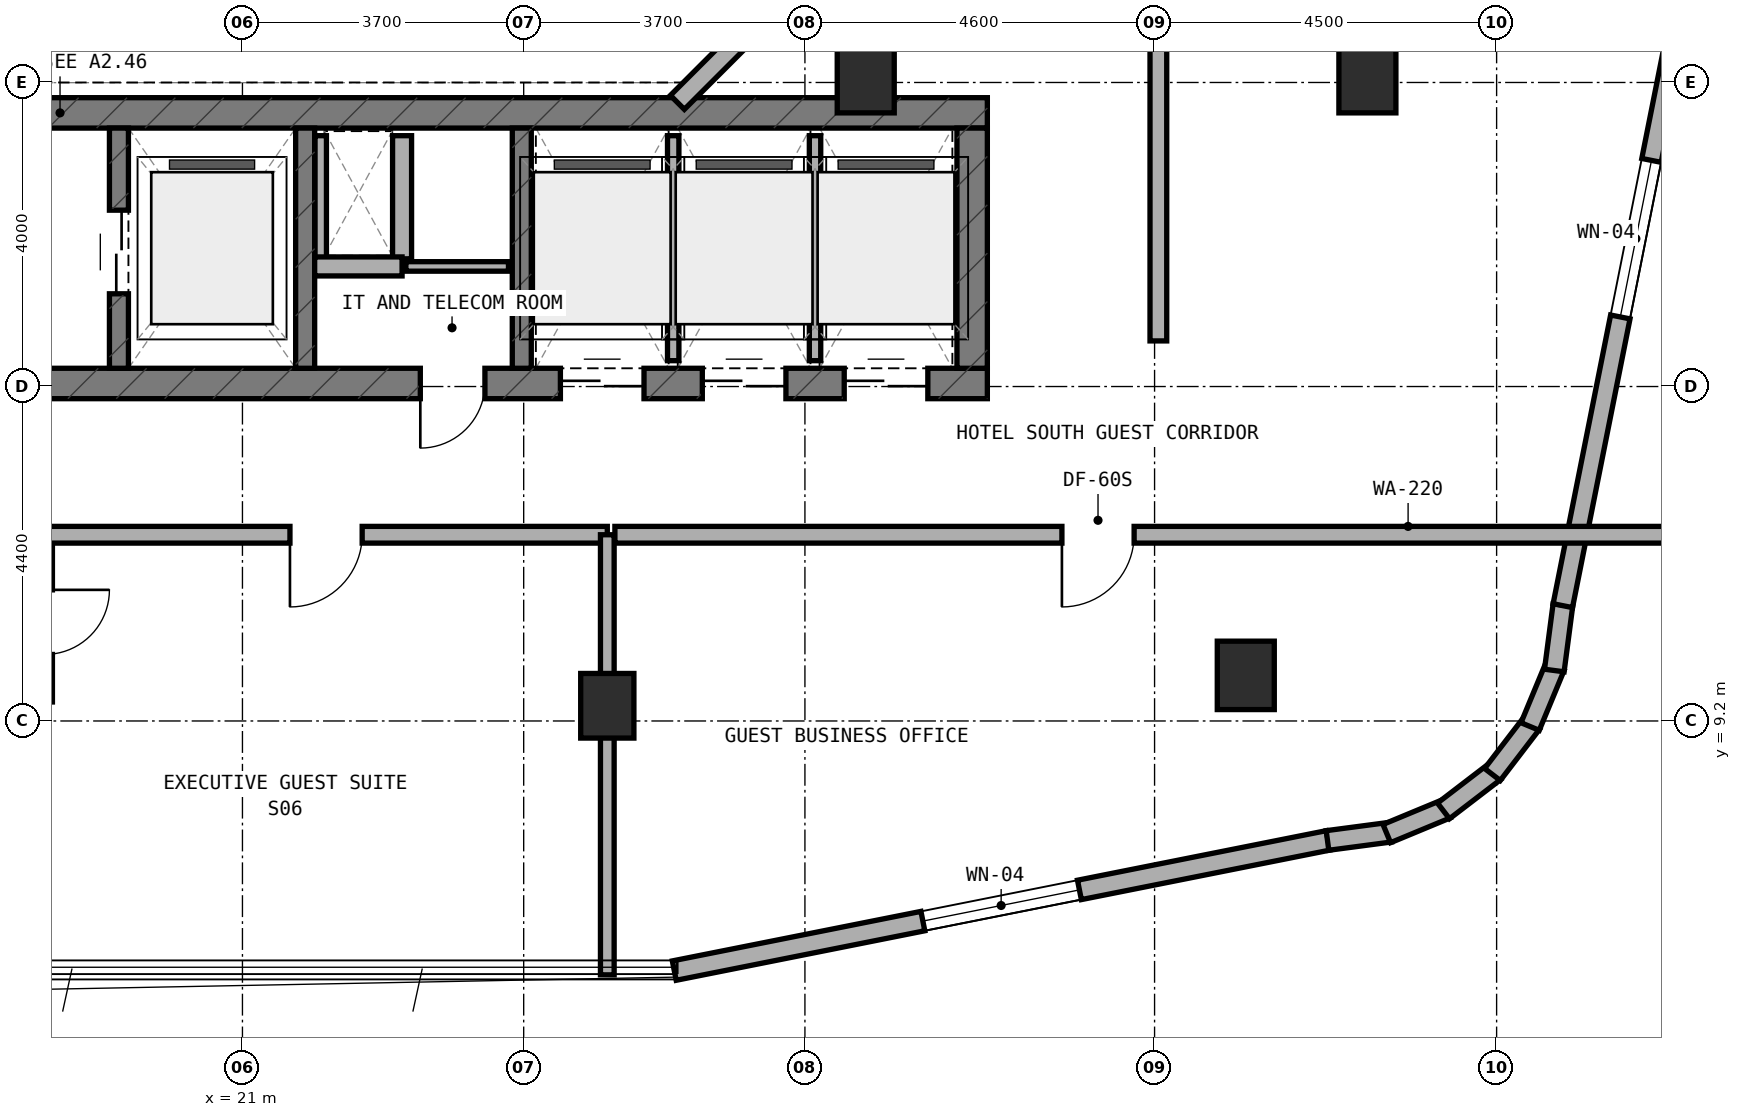
"""IFC4 building model, lengths in metres.
Left out: names, types, materials, properties, quantities, classifications, styles, units other than length and angle.
Written with IfcOpenShell. Run it as: python <this file> out.ifc"""

import sys

from ifc_helpers import new_model, si_unit, direction, frame, frame_2d, origin, origin_2d, place, context, subcontext, project, spatial, rectangle, extrude, element, fill, save


model = new_model("IFC4")
c1 = context("Model", 3, precision=1e-05, world=origin(), true_north=direction((0.0, 1.0)))
c2 = subcontext(c1, "Body", "Model", "MODEL_VIEW")
j1 = project(units=[si_unit("LENGTHUNIT", "METRE"), si_unit("PLANEANGLEUNIT", "RADIAN")], contexts=[c1])
p1 = place(None, origin())
s1 = spatial("IfcSite", under=j1, at=p1, CompositionType="ELEMENT")
p2 = place(p1, origin())
s2 = spatial("IfcBuilding", under=s1, at=p2, CompositionType="ELEMENT")
p3 = place(p2, frame((0.0, 0.0, 217.1)))
s3 = spatial("IfcBuildingStorey", under=s2, at=p3, CompositionType="ELEMENT", Elevation=217.1)
p4 = place(p3, frame((6.4, 13.64, 0.0), z_axis=(0.0, 0.0, 1.0), x_axis=(1.0, 0.0, 0.0)))
e1 = element("IfcWall", 1, at=p4, inside=s3, PredefinedType="SHEAR", context=c2, shape_type="SweptSolid", body=[
    extrude(rectangle(XDim=24.4, YDim=0.4, at=frame_2d((12.2, 0.0))), origin(), (0.0, 0.0, 1.0), 3.6),
])
p5 = place(p4, frame((9.15, 0.0, 0.0)))
e2 = element("IfcOpeningElement", 2, at=p5, cuts=e1, PredefinedType="OPENING", context=c2, shape_type="SweptSolid", body=[
    extrude(rectangle(XDim=1.2, YDim=2.15, at=frame_2d((0.6, 1.075))), frame((0.0, 0.21, 0.0), z_axis=(0.0, -1.0, 0.0), x_axis=(1.0, 0.0, 0.0)), (0.0, 0.0, 1.0), 0.42),
])
p6 = place(p4, frame((16.94, 0.0, 0.0)))
e3 = element("IfcOpeningElement", 3, at=p6, cuts=e1, PredefinedType="OPENING", context=c2, shape_type="SweptSolid", body=[
    extrude(rectangle(XDim=0.85, YDim=2.1, at=frame_2d((0.425, 1.05))), frame((0.0, 0.21, 0.0), z_axis=(0.0, -1.0, 0.0), x_axis=(1.0, 0.0, 0.0)), (0.0, 0.0, 1.0), 0.42),
])
p7 = place(p4, frame((18.783, 0.0, 0.0)))
e4 = element("IfcOpeningElement", 4, at=p7, cuts=e1, PredefinedType="OPENING", context=c2, shape_type="SweptSolid", body=[
    extrude(rectangle(XDim=1.1, YDim=2.15, at=frame_2d((0.55, 1.075))), frame((0.0, 0.21, 0.0), z_axis=(0.0, -1.0, 0.0), x_axis=(1.0, 0.0, 0.0)), (0.0, 0.0, 1.0), 0.42),
])
p8 = place(p4, frame((20.65, 0.0, 0.0)))
e5 = element("IfcOpeningElement", 5, at=p8, cuts=e1, PredefinedType="OPENING", context=c2, shape_type="SweptSolid", body=[
    extrude(rectangle(XDim=1.1, YDim=2.15, at=frame_2d((0.55, 1.075))), frame((0.0, 0.21, 0.0), z_axis=(0.0, -1.0, 0.0), x_axis=(1.0, 0.0, 0.0)), (0.0, 0.0, 1.0), 0.42),
])
p9 = place(p4, frame((22.517, 0.0, 0.0)))
e6 = element("IfcOpeningElement", 6, at=p9, cuts=e1, PredefinedType="OPENING", context=c2, shape_type="SweptSolid", body=[
    extrude(rectangle(XDim=1.1, YDim=2.15, at=frame_2d((0.55, 1.075))), frame((0.0, 0.21, 0.0), z_axis=(0.0, -1.0, 0.0), x_axis=(1.0, 0.0, 0.0)), (0.0, 0.0, 1.0), 0.42),
])
p10 = place(p3, frame((6.4, 17.2, 0.0), z_axis=(0.0, 0.0, 1.0), x_axis=(1.0, 0.0, 0.0)))
e7 = element("IfcWall", 7, at=p10, inside=s3, PredefinedType="SHEAR", context=c2, shape_type="SweptSolid", body=[
    extrude(rectangle(XDim=24.4, YDim=0.4, at=frame_2d((12.2, 0.0))), origin(), (0.0, 0.0, 1.0), 3.6),
])
p11 = place(p3, frame((30.6, 13.84, 0.0), z_axis=(0.0, 0.0, 1.0), x_axis=(0.0, 1.0, 0.0)))
e8 = element("IfcWall", 8, at=p11, inside=s3, PredefinedType="SHEAR", context=c2, shape_type="SweptSolid", body=[
    extrude(rectangle(XDim=3.16, YDim=0.4, at=frame_2d((1.58, 0.0))), origin(), (0.0, 0.0, 1.0), 3.6),
])
p12 = place(p3, frame((19.375, 13.84, 0.0), z_axis=(0.0, 0.0, 1.0), x_axis=(0.0, 1.0, 0.0)))
e9 = element("IfcWall", 9, at=p12, inside=s3, PredefinedType="STANDARD", context=c2, shape_type="SweptSolid", body=[
    extrude(rectangle(XDim=3.16, YDim=0.25, at=frame_2d((1.58, 0.0))), origin(), (0.0, 0.0, 1.0), 3.32),
])
p13 = place(p12, frame((0.98, 0.0, 0.0)))
e10 = element("IfcOpeningElement", 10, at=p13, cuts=e9, PredefinedType="OPENING", context=c2, shape_type="SweptSolid", body=[
    extrude(rectangle(XDim=1.1, YDim=2.15, at=frame_2d((0.55, 1.075))), frame((0.0, 0.135, 0.0), z_axis=(0.0, -1.0, 0.0), x_axis=(1.0, 0.0, 0.0)), (0.0, 0.0, 1.0), 0.27),
])
for number, where, z_axis, x_axis in (
    (11, (21.825, 13.84, 0.0), (0.0, 0.0, 1.0), (0.0, 1.0, 0.0)),
    (12, (24.675, 13.84, 0.0), (0.0, 0.0, 1.0), (0.0, 1.0, 0.0)),
):
    element("IfcWall", number, at=place(p3, frame(where, z_axis=z_axis, x_axis=x_axis)), inside=s3, PredefinedType="STANDARD", context=c2, shape_type="SweptSolid", body=[
        extrude(rectangle(XDim=3.16, YDim=0.25, at=frame_2d((1.58, 0.0))), origin(), (0.0, 0.0, 1.0), 3.32),
    ])
p14 = place(p3, frame((25.8, 9.4, 0.0), z_axis=(0.0, 0.0, 1.0), x_axis=(1.0, 0.0, 0.0)))
e13 = element("IfcColumn", 13, at=p14, inside=s3, PredefinedType="COLUMN", context=c2, shape_type="SweptSolid", body=[
    extrude(rectangle(XDim=0.7, YDim=0.85, at=origin_2d()), origin(), (0.0, 0.0, 1.0), 3.6),
])
for number, where, z_axis, x_axis in (
    (14, (34.2, 9.8, 0.0), (0.0, 0.0, 1.0), (1.0, 0.0, 0.0)),
    (15, (35.8, 17.65, 0.0), (0.0, 0.0, 1.0), (1.0, 0.0, 0.0)),
    (16, (29.2, 17.65, 0.0), (0.0, 0.0, 1.0), (1.0, 0.0, 0.0)),
):
    element("IfcColumn", number, at=place(p3, frame(where, z_axis=z_axis, x_axis=x_axis)), inside=s3, PredefinedType="COLUMN", context=c2, shape_type="SweptSolid", body=[
        extrude(rectangle(XDim=0.75, YDim=0.9, at=origin_2d()), origin(), (0.0, 0.0, 1.0), 3.6),
    ])
p15 = place(p3, frame((26.681, 5.916, 0.0), z_axis=(0.0, 0.0, 1.0), x_axis=(0.980745199176, 0.195291715883, 0.0)))
e17 = element("IfcWall", 17, at=p15, inside=s3, PredefinedType="STANDARD", context=c2, shape_type="SweptSolid", body=[
    extrude(rectangle(XDim=8.771, YDim=0.26, at=frame_2d((4.385, 0.0))), origin(), (0.0, 0.0, 1.0), 3.32),
])
p16 = place(p15, frame((3.335, 0.0, 0.85)))
e18 = element("IfcOpeningElement", 18, at=p16, cuts=e17, PredefinedType="OPENING", context=c2, shape_type="SweptSolid", body=[
    extrude(rectangle(XDim=2.1, YDim=1.5, at=frame_2d((1.05, 0.75))), frame((0.0, 0.14, 0.0), z_axis=(0.0, -1.0, 0.0), x_axis=(1.0, 0.0, 0.0)), (0.0, 0.0, 1.0), 0.28),
])
p17 = place(p3, frame((35.275, 7.628, 0.0), z_axis=(0.0, 0.0, 1.0), x_axis=(0.9913883573, 0.130954667764, 0.0)))
e19 = element("IfcWall", 19, at=p17, inside=s3, PredefinedType="STANDARD", context=c2, shape_type="SweptSolid", body=[
    extrude(rectangle(XDim=0.833, YDim=0.26, at=frame_2d((0.417, 0.0))), origin(), (0.0, 0.0, 1.0), 3.32),
])
p18 = place(p3, frame((36.055, 7.719, 0.0), z_axis=(0.0, 0.0, 1.0), x_axis=(0.923754491172, 0.382985169477, 0.0)))
e20 = element("IfcWall", 20, at=p18, inside=s3, PredefinedType="STANDARD", context=c2, shape_type="SweptSolid", body=[
    extrude(rectangle(XDim=0.851, YDim=0.26, at=frame_2d((0.426, 0.0))), origin(), (0.0, 0.0, 1.0), 3.32),
])
for number, where, z_axis, x_axis in (
    (21, (36.801, 8.017, 0.0), (0.0, 0.0, 1.0), (0.794, 0.608, 0.0)),
    (22, (37.445, 8.496, 0.0), (0.0, 0.0, 1.0), (0.608, 0.794, 0.0)),
):
    element("IfcWall", number, at=place(p3, frame(where, z_axis=z_axis, x_axis=x_axis)), inside=s3, PredefinedType="STANDARD", context=c2, shape_type="SweptSolid", body=[
        extrude(rectangle(XDim=0.85, YDim=0.26, at=frame_2d((0.425, 0.0))), origin(), (0.0, 0.0, 1.0), 3.32),
    ])
p19 = place(p3, frame((37.941, 9.127, 0.0), z_axis=(0.0, 0.0, 1.0), x_axis=(0.383229930484, 0.923652976167, 0.0)))
e23 = element("IfcWall", 23, at=p19, inside=s3, PredefinedType="STANDARD", context=c2, shape_type="SweptSolid", body=[
    extrude(rectangle(XDim=0.851, YDim=0.26, at=frame_2d((0.426, 0.0))), origin(), (0.0, 0.0, 1.0), 3.32),
])
p20 = place(p3, frame((38.259, 9.864, 0.0), z_axis=(0.0, 0.0, 1.0), x_axis=(0.130156359936, 0.991493480548, 0.0)))
e24 = element("IfcWall", 24, at=p20, inside=s3, PredefinedType="STANDARD", context=c2, shape_type="SweptSolid", body=[
    extrude(rectangle(XDim=0.868, YDim=0.26, at=frame_2d((0.434, 0.0))), origin(), (0.0, 0.0, 1.0), 3.32),
])
p21 = place(p3, frame((38.371, 10.717, 0.0), z_axis=(0.0, 0.0, 1.0), x_axis=(0.195291715883, 0.980745199176, 0.0)))
e25 = element("IfcWall", 25, at=p21, inside=s3, PredefinedType="STANDARD", context=c2, shape_type="SweptSolid", body=[
    extrude(rectangle(XDim=8.771, YDim=0.26, at=frame_2d((4.385, 0.0))), origin(), (0.0, 0.0, 1.0), 3.32),
])
p22 = place(p21, frame((3.873, 0.0, 0.85)))
e26 = element("IfcOpeningElement", 26, at=p22, cuts=e25, PredefinedType="OPENING", context=c2, shape_type="SweptSolid", body=[
    extrude(rectangle(XDim=2.1, YDim=1.5, at=frame_2d((1.05, 0.75))), frame((0.0, 0.14, 0.0), z_axis=(0.0, -1.0, 0.0), x_axis=(1.0, 0.0, 0.0)), (0.0, 0.0, 1.0), 0.28),
])
p23 = place(p3, frame((26.722, 17.338, 0.0), z_axis=(0.0, 0.0, 1.0), x_axis=(0.707059717605, 0.707153841636, 0.0)))
e27 = element("IfcWall", 27, at=p23, inside=s3, PredefinedType="STANDARD", context=c2, shape_type="SweptSolid", body=[
    extrude(rectangle(XDim=2.594, YDim=0.26, at=frame_2d((1.297, 0.0))), origin(), (0.0, 0.0, 1.0), 3.32),
])
p24 = place(p3, frame((22.03, 15.28, 0.0), z_axis=(0.0, 0.0, 1.0), x_axis=(0.0, 1.0, 0.0)))
e28 = element("IfcWall", 28, at=p24, inside=s3, PredefinedType="PARTITIONING", context=c2, shape_type="SweptSolid", body=[
    extrude(rectangle(XDim=1.62, YDim=0.15, at=frame_2d((0.81, 0.0))), origin(), (0.0, 0.0, 1.0), 3.32),
])
p25 = place(p3, frame((23.1, 15.28, 0.0), z_axis=(0.0, 0.0, 1.0), x_axis=(0.0, 1.0, 0.0)))
e29 = element("IfcWall", 29, at=p25, inside=s3, PredefinedType="SOLIDWALL", context=c2, shape_type="SweptSolid", body=[
    extrude(rectangle(XDim=1.62, YDim=0.25, at=frame_2d((0.81, 0.0))), origin(), (0.0, 0.0, 1.0), 3.32),
])
p26 = place(p3, frame((21.95, 15.18, 0.0), z_axis=(0.0, 0.0, 1.0), x_axis=(1.0, 0.0, 0.0)))
e30 = element("IfcWall", 30, at=p26, inside=s3, PredefinedType="SOLIDWALL", context=c2, shape_type="SweptSolid", body=[
    extrude(rectangle(XDim=1.15, YDim=0.25, at=frame_2d((0.575, 0.0))), origin(), (0.0, 0.0, 1.0), 3.32),
])
p27 = place(p3, frame((23.15, 15.18, 0.0), z_axis=(0.0, 0.0, 1.0), x_axis=(1.0, 0.0, 0.0)))
e31 = element("IfcWall", 31, at=p27, inside=s3, PredefinedType="PARTITIONING", context=c2, shape_type="SweptSolid", body=[
    extrude(rectangle(XDim=1.35, YDim=0.125, at=frame_2d((0.675, 0.0))), origin(), (0.0, 0.0, 1.0), 3.32),
])
p28 = place(p3, frame((26.667, 13.94, 0.0), z_axis=(0.0, 0.0, 1.0), x_axis=(0.0, 1.0, 0.0)))
e32 = element("IfcWall", 32, at=p28, inside=s3, PredefinedType="PARTITIONING", context=c2, shape_type="SweptSolid", body=[
    extrude(rectangle(XDim=2.96, YDim=0.15, at=frame_2d((1.48, 0.0))), origin(), (0.0, 0.0, 1.0), 3.32),
])
p29 = place(p3, frame((28.533, 13.94, 0.0), z_axis=(0.0, 0.0, 1.0), x_axis=(0.0, 1.0, 0.0)))
e33 = element("IfcWall", 33, at=p29, inside=s3, PredefinedType="PARTITIONING", context=c2, shape_type="SweptSolid", body=[
    extrude(rectangle(XDim=2.96, YDim=0.15, at=frame_2d((1.48, 0.0))), origin(), (0.0, 0.0, 1.0), 2.695),
])
p30 = place(p3, frame((18.4, 11.65, 0.0), z_axis=(0.0, 0.0, 1.0), x_axis=(1.0, 0.0, 0.0)))
e34 = element("IfcWall", 34, at=p30, inside=s3, PredefinedType="SOLIDWALL", context=c2, shape_type="SweptSolid", body=[
    extrude(rectangle(XDim=7.4, YDim=0.22, at=frame_2d((3.7, 0.0))), origin(), (0.0, 0.0, 1.0), 2.695),
])
p31 = place(p30, frame((3.225, 0.0, 0.0)))
e35 = element("IfcOpeningElement", 35, at=p31, cuts=e34, PredefinedType="OPENING", context=c2, shape_type="SweptSolid", body=[
    extrude(rectangle(XDim=0.95, YDim=2.1, at=frame_2d((0.475, 1.05))), frame((0.0, 0.12, 0.0), z_axis=(0.0, -1.0, 0.0), x_axis=(1.0, 0.0, 0.0)), (0.0, 0.0, 1.0), 0.24),
])
p32 = place(p3, frame((25.8, 5.86, 0.0), z_axis=(0.0, 0.0, 1.0), x_axis=(0.0, 1.0, 0.0)))
e36 = element("IfcWall", 36, at=p32, inside=s3, PredefinedType="SOLIDWALL", context=c2, shape_type="SweptSolid", body=[
    extrude(rectangle(XDim=5.79, YDim=0.18, at=frame_2d((2.895, 0.0))), origin(), (0.0, 0.0, 1.0), 2.695),
])
p33 = place(p3, frame((25.9, 11.65, 0.0), z_axis=(0.0, 0.0, 1.0), x_axis=(1.0, 0.0, 0.0)))
e37 = element("IfcWall", 37, at=p33, inside=s3, PredefinedType="SOLIDWALL", context=c2, shape_type="SweptSolid", body=[
    extrude(rectangle(XDim=14.04, YDim=0.22, at=frame_2d((7.02, 0.0))), origin(), (0.0, 0.0, 1.0), 2.695),
])
p34 = place(p33, frame((5.881, 0.0, 0.0)))
e38 = element("IfcOpeningElement", 38, at=p34, cuts=e37, PredefinedType="OPENING", context=c2, shape_type="SweptSolid", body=[
    extrude(rectangle(XDim=0.95, YDim=2.1, at=frame_2d((0.475, 1.05))), frame((0.0, 0.12, 0.0), z_axis=(0.0, -1.0, 0.0), x_axis=(1.0, 0.0, 0.0)), (0.0, 0.0, 1.0), 0.24),
])
p35 = place(p3, frame((33.05, 14.2, 0.0), z_axis=(0.0, 0.0, 1.0), x_axis=(0.0, 1.0, 0.0)))
e39 = element("IfcWall", 39, at=p35, inside=s3, PredefinedType="SOLIDWALL", context=c2, shape_type="SweptSolid", body=[
    extrude(rectangle(XDim=9.37, YDim=0.22, at=frame_2d((4.685, 0.0))), origin(), (0.0, 0.0, 1.0), 2.695),
])
p36 = place(p35, frame((4.21, 0.0, 0.0)))
e40 = element("IfcOpeningElement", 40, at=p36, cuts=e39, PredefinedType="OPENING", context=c2, shape_type="SweptSolid", body=[
    extrude(rectangle(XDim=0.95, YDim=2.1, at=frame_2d((0.475, 1.05))), frame((0.0, 0.12, 0.0), z_axis=(0.0, -1.0, 0.0), x_axis=(1.0, 0.0, 0.0)), (0.0, 0.0, 1.0), 0.24),
])
p37 = place(p16, origin())
e41 = element("IfcWindow", 41, at=p37, inside=s3, PartitioningType="SINGLE_PANEL", PredefinedType="WINDOW", context=c2, shape_type="SweptSolid", body=[
    extrude(rectangle(XDim=2.1, YDim=1.5, at=frame_2d((1.05, 0.75))), frame((0.0, 0.03, 0.0), z_axis=(0.0, -1.0, 0.0), x_axis=(1.0, 0.0, 0.0)), (0.0, 0.0, 1.0), 0.06),
])
fill(e18, e41)
p38 = place(p22, origin())
e42 = element("IfcWindow", 42, at=p38, inside=s3, PartitioningType="SINGLE_PANEL", PredefinedType="WINDOW", context=c2, shape_type="SweptSolid", body=[
    extrude(rectangle(XDim=2.1, YDim=1.5, at=frame_2d((1.05, 0.75))), frame((0.0, 0.03, 0.0), z_axis=(0.0, -1.0, 0.0), x_axis=(1.0, 0.0, 0.0)), (0.0, 0.0, 1.0), 0.06),
])
fill(e26, e42)
p39 = place(p13, origin())
e43 = element("IfcDoor", 43, at=p39, inside=s3, OperationType="DOUBLE_DOOR_SLIDING", PredefinedType="DOOR", context=c2, shape_type="SweptSolid", body=[
    extrude(rectangle(XDim=1.1, YDim=2.15, at=frame_2d((0.55, 1.075))), frame((0.0, 0.025, 0.0), z_axis=(0.0, -1.0, 0.0), x_axis=(1.0, 0.0, 0.0)), (0.0, 0.0, 1.0), 0.05),
])
fill(e10, e43)
p40 = place(p6, frame((0.85, 0.0, 0.0), z_axis=(0.0, 0.0, 1.0), x_axis=(-1.0, 0.0, 0.0)))
e44 = element("IfcDoor", 44, at=p40, inside=s3, OperationType="SINGLE_SWING_RIGHT", PredefinedType="DOOR", context=c2, shape_type="SweptSolid", body=[
    extrude(rectangle(XDim=0.85, YDim=2.1, at=frame_2d((0.425, 1.05))), frame((0.0, 0.025, 0.0), z_axis=(0.0, -1.0, 0.0), x_axis=(1.0, 0.0, 0.0)), (0.0, 0.0, 1.0), 0.05),
])
fill(e3, e44)
p41 = place(p7, frame((1.1, 0.0, 0.0), z_axis=(0.0, 0.0, 1.0), x_axis=(-1.0, 0.0, 0.0)))
e45 = element("IfcDoor", 45, at=p41, inside=s3, OperationType="DOUBLE_DOOR_SLIDING", PredefinedType="DOOR", context=c2, shape_type="SweptSolid", body=[
    extrude(rectangle(XDim=1.1, YDim=2.15, at=frame_2d((0.55, 1.075))), frame((0.0, 0.025, 0.0), z_axis=(0.0, -1.0, 0.0), x_axis=(1.0, 0.0, 0.0)), (0.0, 0.0, 1.0), 0.05),
])
fill(e4, e45)
p42 = place(p8, frame((1.1, 0.0, 0.0), z_axis=(0.0, 0.0, 1.0), x_axis=(-1.0, 0.0, 0.0)))
e46 = element("IfcDoor", 46, at=p42, inside=s3, OperationType="DOUBLE_DOOR_SLIDING", PredefinedType="DOOR", context=c2, shape_type="SweptSolid", body=[
    extrude(rectangle(XDim=1.1, YDim=2.15, at=frame_2d((0.55, 1.075))), frame((0.0, 0.025, 0.0), z_axis=(0.0, -1.0, 0.0), x_axis=(1.0, 0.0, 0.0)), (0.0, 0.0, 1.0), 0.05),
])
fill(e5, e46)
p43 = place(p9, frame((1.1, 0.0, 0.0), z_axis=(0.0, 0.0, 1.0), x_axis=(-1.0, 0.0, 0.0)))
e47 = element("IfcDoor", 47, at=p43, inside=s3, OperationType="DOUBLE_DOOR_SLIDING", PredefinedType="DOOR", context=c2, shape_type="SweptSolid", body=[
    extrude(rectangle(XDim=1.1, YDim=2.15, at=frame_2d((0.55, 1.075))), frame((0.0, 0.025, 0.0), z_axis=(0.0, -1.0, 0.0), x_axis=(1.0, 0.0, 0.0)), (0.0, 0.0, 1.0), 0.05),
])
fill(e6, e47)
p44 = place(p31, frame((0.95, 0.0, 0.0), z_axis=(0.0, 0.0, 1.0), x_axis=(-1.0, 0.0, 0.0)))
e48 = element("IfcDoor", 48, at=p44, inside=s3, OperationType="SINGLE_SWING_RIGHT", PredefinedType="DOOR", context=c2, shape_type="SweptSolid", body=[
    extrude(rectangle(XDim=0.95, YDim=2.1, at=frame_2d((0.475, 1.05))), frame((0.0, 0.025, 0.0), z_axis=(0.0, -1.0, 0.0), x_axis=(1.0, 0.0, 0.0)), (0.0, 0.0, 1.0), 0.05),
])
fill(e35, e48)
p45 = place(p34, frame((0.95, 0.0, 0.0), z_axis=(0.0, 0.0, 1.0), x_axis=(-1.0, 0.0, 0.0)))
e49 = element("IfcDoor", 49, at=p45, inside=s3, OperationType="SINGLE_SWING_RIGHT", PredefinedType="DOOR", context=c2, shape_type="SweptSolid", body=[
    extrude(rectangle(XDim=0.95, YDim=2.1, at=frame_2d((0.475, 1.05))), frame((0.0, 0.025, 0.0), z_axis=(0.0, -1.0, 0.0), x_axis=(1.0, 0.0, 0.0)), (0.0, 0.0, 1.0), 0.05),
])
fill(e38, e49)
save(model, sys.argv[1])
